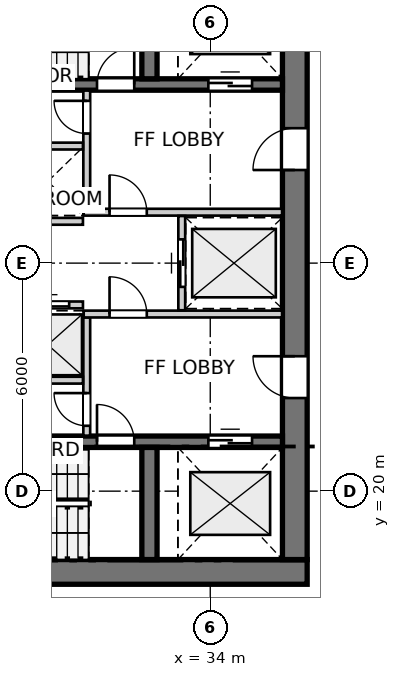
"""IFC4 building model, lengths in metres.
Left out: names, types, materials, properties, quantities, classifications, styles, units other than length and angle.
Written with IfcOpenShell. Run it as: python <this file> out.ifc"""

import sys

from ifc_helpers import new_model, si_unit, direction, frame, frame_2d, origin, place, context, subcontext, project, spatial, rectangle, extrude, source, transform, mapped, element, fill, save


model = new_model("IFC4")
c1 = context("Model", 3, precision=1e-05, world=origin(), true_north=direction((0.0, 1.0)))
c2 = subcontext(c1, "Body", "Model", "MODEL_VIEW")
j1 = project(units=[si_unit("LENGTHUNIT", "METRE"), si_unit("PLANEANGLEUNIT", "RADIAN")], contexts=[c1])
p1 = place(None, origin())
s1 = spatial("IfcSite", under=j1, at=p1, CompositionType="ELEMENT")
p2 = place(p1, origin())
s2 = spatial("IfcBuilding", under=s1, at=p2, CompositionType="ELEMENT")
p3 = place(p2, frame((0.0, 0.0, 118.4)))
s3 = spatial("IfcBuildingStorey", under=s2, at=p3, CompositionType="ELEMENT", Elevation=118.4)
p4 = place(p3, frame((24.15, 17.875, 0.0), z_axis=(0.0, 0.0, 1.0), x_axis=(1.0, 0.0, 0.0)))
e1 = element("IfcWall", 1, at=p4, inside=s3, PredefinedType="SHEAR", context=c2, shape_type="SweptSolid", body=[
    extrude(rectangle(XDim=12.4, YDim=0.65, at=frame_2d((6.2, 0.0))), origin(), (0.0, 0.0, 1.0), 2.95),
])
p5 = place(p3, frame((36.225, 18.2, 0.0), z_axis=(0.0, 0.0, 1.0), x_axis=(0.0, 1.0, 0.0)))
e2 = element("IfcWall", 2, at=p5, inside=s3, PredefinedType="SHEAR", context=c2, shape_type="SweptSolid", body=[
    extrude(rectangle(XDim=15.6, YDim=0.65, at=frame_2d((7.8, 0.0))), origin(), (0.0, 0.0, 1.0), 2.95),
])
p6 = place(p5, frame((4.25, 0.0, 0.0)))
e3 = element("IfcOpeningElement", 3, at=p6, cuts=e2, PredefinedType="OPENING", context=c2, shape_type="SweptSolid", body=[
    extrude(rectangle(XDim=1.1, YDim=2.15, at=frame_2d((0.55, 1.075))), frame((0.0, 0.335, 0.0), z_axis=(0.0, -1.0, 0.0), x_axis=(1.0, 0.0, 0.0)), (0.0, 0.0, 1.0), 0.67),
])
p7 = place(p5, frame((10.25, 0.0, 0.0)))
e4 = element("IfcOpeningElement", 4, at=p7, cuts=e2, PredefinedType="OPENING", context=c2, shape_type="SweptSolid", body=[
    extrude(rectangle(XDim=1.1, YDim=2.15, at=frame_2d((0.55, 1.075))), frame((0.0, 0.335, 0.0), z_axis=(0.0, -1.0, 0.0), x_axis=(1.0, 0.0, 0.0)), (0.0, 0.0, 1.0), 0.67),
])
p8 = place(p3, frame((24.8, 21.3, 0.0), z_axis=(0.0, 0.0, 1.0), x_axis=(1.0, 0.0, 0.0)))
e5 = element("IfcWall", 5, at=p8, inside=s3, PredefinedType="SHEAR", context=c2, shape_type="SweptSolid", body=[
    extrude(rectangle(XDim=11.1, YDim=0.3, at=frame_2d((5.55, 0.0))), origin(), (0.0, 0.0, 1.0), 2.95),
])
p9 = place(p8, frame((6.22, 0.0, 0.0)))
e6 = element("IfcOpeningElement", 6, at=p9, cuts=e5, PredefinedType="OPENING", context=c2, shape_type="SweptSolid", body=[
    extrude(rectangle(XDim=0.98, YDim=2.15, at=frame_2d((0.49, 1.075))), frame((0.0, 0.16, 0.0), z_axis=(0.0, -1.0, 0.0), x_axis=(1.0, 0.0, 0.0)), (0.0, 0.0, 1.0), 0.32),
])
p10 = place(p8, frame((9.15, 0.0, 0.0)))
e7 = element("IfcOpeningElement", 7, at=p10, cuts=e5, PredefinedType="OPENING", context=c2, shape_type="SweptSolid", body=[
    extrude(rectangle(XDim=1.15, YDim=2.15, at=frame_2d((0.575, 1.075))), frame((0.0, 0.16, 0.0), z_axis=(0.0, -1.0, 0.0), x_axis=(1.0, 0.0, 0.0)), (0.0, 0.0, 1.0), 0.32),
])
p11 = place(p3, frame((32.4, 18.2, 0.0), z_axis=(0.0, 0.0, 1.0), x_axis=(0.0, 1.0, 0.0)))
e8 = element("IfcWall", 8, at=p11, inside=s3, PredefinedType="SHEAR", context=c2, shape_type="SweptSolid", body=[
    extrude(rectangle(XDim=2.95, YDim=0.4, at=frame_2d((1.475, 0.0))), origin(), (0.0, 0.0, 1.0), 2.95),
])
p12 = place(p3, frame((24.8, 30.7, 0.0), z_axis=(0.0, 0.0, 1.0), x_axis=(1.0, 0.0, 0.0)))
e9 = element("IfcWall", 9, at=p12, inside=s3, PredefinedType="SHEAR", context=c2, shape_type="SweptSolid", body=[
    extrude(rectangle(XDim=11.1, YDim=0.3, at=frame_2d((5.55, 0.0))), origin(), (0.0, 0.0, 1.0), 2.95),
])
p13 = place(p12, frame((6.22, 0.0, 0.0)))
e10 = element("IfcOpeningElement", 10, at=p13, cuts=e9, PredefinedType="OPENING", context=c2, shape_type="SweptSolid", body=[
    extrude(rectangle(XDim=0.98, YDim=2.15, at=frame_2d((0.49, 1.075))), frame((0.0, 0.16, 0.0), z_axis=(0.0, -1.0, 0.0), x_axis=(1.0, 0.0, 0.0)), (0.0, 0.0, 1.0), 0.32),
])
p14 = place(p12, frame((9.15, 0.0, 0.0)))
e11 = element("IfcOpeningElement", 11, at=p14, cuts=e9, PredefinedType="OPENING", context=c2, shape_type="SweptSolid", body=[
    extrude(rectangle(XDim=1.15, YDim=2.15, at=frame_2d((0.575, 1.075))), frame((0.0, 0.16, 0.0), z_axis=(0.0, -1.0, 0.0), x_axis=(1.0, 0.0, 0.0)), (0.0, 0.0, 1.0), 0.32),
])
p15 = place(p3, frame((32.4, 30.85, 0.0), z_axis=(0.0, 0.0, 1.0), x_axis=(0.0, 1.0, 0.0)))
e12 = element("IfcWall", 12, at=p15, inside=s3, PredefinedType="SHEAR", context=c2, shape_type="SweptSolid", body=[
    extrude(rectangle(XDim=2.95, YDim=0.4, at=frame_2d((1.475, 0.0))), origin(), (0.0, 0.0, 1.0), 2.95),
])
p16 = place(p3, frame((30.75, 21.46, 0.0), z_axis=(0.0, 0.0, 1.0), x_axis=(0.0, 1.0, 0.0)))
e13 = element("IfcWall", 13, at=p16, inside=s3, PredefinedType="PARTITIONING", context=c2, shape_type="SweptSolid", body=[
    extrude(rectangle(XDim=3.11, YDim=0.18, at=frame_2d((1.555, 0.0))), origin(), (0.0, 0.0, 1.0), 2.95),
])
p17 = place(p16, frame((0.26, 0.0, 0.0)))
e14 = element("IfcOpeningElement", 14, at=p17, cuts=e13, PredefinedType="OPENING", context=c2, shape_type="SweptSolid", body=[
    extrude(rectangle(XDim=0.86, YDim=2.05, at=frame_2d((0.43, 1.025))), frame((0.0, 0.1, 0.0), z_axis=(0.0, -1.0, 0.0), x_axis=(1.0, 0.0, 0.0)), (0.0, 0.0, 1.0), 0.2),
])
p18 = place(p3, frame((30.67, 24.66, 0.0), z_axis=(0.0, 0.0, 1.0), x_axis=(1.0, 0.0, 0.0)))
e15 = element("IfcWall", 15, at=p18, inside=s3, PredefinedType="PARTITIONING", context=c2, shape_type="SweptSolid", body=[
    extrude(rectangle(XDim=5.22, YDim=0.18, at=frame_2d((2.61, 0.0))), origin(), (0.0, 0.0, 1.0), 2.95),
])
p19 = place(p18, frame((0.68, 0.0, 0.0)))
e16 = element("IfcOpeningElement", 16, at=p19, cuts=e15, PredefinedType="OPENING", context=c2, shape_type="SweptSolid", body=[
    extrude(rectangle(XDim=0.98, YDim=2.15, at=frame_2d((0.49, 1.075))), frame((0.0, 0.1, 0.0), z_axis=(0.0, -1.0, 0.0), x_axis=(1.0, 0.0, 0.0)), (0.0, 0.0, 1.0), 0.2),
])
p20 = place(p3, frame((30.75, 27.43, 0.0), z_axis=(0.0, 0.0, 1.0), x_axis=(0.0, 1.0, 0.0)))
e17 = element("IfcWall", 17, at=p20, inside=s3, PredefinedType="PARTITIONING", context=c2, shape_type="SweptSolid", body=[
    extrude(rectangle(XDim=3.11, YDim=0.18, at=frame_2d((1.555, 0.0))), origin(), (0.0, 0.0, 1.0), 2.95),
])
p21 = place(p20, frame((1.98, 0.0, 0.0)))
e18 = element("IfcOpeningElement", 18, at=p21, cuts=e17, PredefinedType="OPENING", context=c2, shape_type="SweptSolid", body=[
    extrude(rectangle(XDim=0.86, YDim=2.05, at=frame_2d((0.43, 1.025))), frame((0.0, 0.1, 0.0), z_axis=(0.0, -1.0, 0.0), x_axis=(1.0, 0.0, 0.0)), (0.0, 0.0, 1.0), 0.2),
])
p22 = place(p3, frame((30.67, 27.34, 0.0), z_axis=(0.0, 0.0, 1.0), x_axis=(1.0, 0.0, 0.0)))
e19 = element("IfcWall", 19, at=p22, inside=s3, PredefinedType="PARTITIONING", context=c2, shape_type="SweptSolid", body=[
    extrude(rectangle(XDim=5.22, YDim=0.18, at=frame_2d((2.61, 0.0))), origin(), (0.0, 0.0, 1.0), 2.95),
])
p23 = place(p22, frame((0.68, 0.0, 0.0)))
e20 = element("IfcOpeningElement", 20, at=p23, cuts=e19, PredefinedType="OPENING", context=c2, shape_type="SweptSolid", body=[
    extrude(rectangle(XDim=0.98, YDim=2.15, at=frame_2d((0.49, 1.075))), frame((0.0, 0.1, 0.0), z_axis=(0.0, -1.0, 0.0), x_axis=(1.0, 0.0, 0.0)), (0.0, 0.0, 1.0), 0.2),
])
p24 = place(p3, frame((33.25, 24.76, 0.0), z_axis=(0.0, 0.0, 1.0), x_axis=(0.0, 1.0, 0.0)))
e21 = element("IfcWall", 21, at=p24, inside=s3, PredefinedType="PARTITIONING", context=c2, shape_type="SweptSolid", body=[
    extrude(rectangle(XDim=2.48, YDim=0.18, at=frame_2d((1.24, 0.0))), origin(), (0.0, 0.0, 1.0), 2.95),
])
p25 = place(p24, frame((0.615, 0.0, 0.0)))
e22 = element("IfcOpeningElement", 22, at=p25, cuts=e21, PredefinedType="OPENING", context=c2, shape_type="SweptSolid", body=[
    extrude(rectangle(XDim=1.25, YDim=2.15, at=frame_2d((0.625, 1.075))), frame((0.0, 0.1, 0.0), z_axis=(0.0, -1.0, 0.0), x_axis=(1.0, 0.0, 0.0)), (0.0, 0.0, 1.0), 0.2),
])
p26 = place(p3, frame((24.81, 22.92, 0.0), z_axis=(0.0, 0.0, 1.0), x_axis=(1.0, 0.0, 0.0)))
e23 = element("IfcWall", 23, at=p26, inside=s3, PredefinedType="PARTITIONING", context=c2, shape_type="SweptSolid", body=[
    extrude(rectangle(XDim=5.84, YDim=0.18, at=frame_2d((2.92, 0.0))), origin(), (0.0, 0.0, 1.0), 2.95),
])
p27 = place(p3, frame((28.825, 24.9, 0.0), z_axis=(0.0, 0.0, 1.0), x_axis=(1.0, 0.0, 0.0)))
e24 = element("IfcWall", 24, at=p27, inside=s3, PredefinedType="PARTITIONING", context=c2, shape_type="SweptSolid", body=[
    extrude(rectangle(XDim=1.825, YDim=0.18, at=frame_2d((0.913, 0.0))), origin(), (0.0, 0.0, 1.0), 2.95),
])
p28 = place(p27, frame((0.363, 0.0, 0.0)))
e25 = element("IfcOpeningElement", 25, at=p28, cuts=e24, PredefinedType="OPENING", context=c2, shape_type="SweptSolid", body=[
    extrude(rectangle(XDim=1.1, YDim=2.15, at=frame_2d((0.55, 1.075))), frame((0.0, 0.1, 0.0), z_axis=(0.0, -1.0, 0.0), x_axis=(1.0, 0.0, 0.0)), (0.0, 0.0, 1.0), 0.2),
])
p29 = place(p3, frame((24.81, 29.08, 0.0), z_axis=(0.0, 0.0, 1.0), x_axis=(1.0, 0.0, 0.0)))
e26 = element("IfcWall", 26, at=p29, inside=s3, PredefinedType="PARTITIONING", context=c2, shape_type="SweptSolid", body=[
    extrude(rectangle(XDim=5.84, YDim=0.18, at=frame_2d((2.92, 0.0))), origin(), (0.0, 0.0, 1.0), 2.95),
])
p30 = place(p3, frame((28.825, 27.1, 0.0), z_axis=(0.0, 0.0, 1.0), x_axis=(1.0, 0.0, 0.0)))
e27 = element("IfcWall", 27, at=p30, inside=s3, PredefinedType="PARTITIONING", context=c2, shape_type="SweptSolid", body=[
    extrude(rectangle(XDim=1.825, YDim=0.18, at=frame_2d((0.913, 0.0))), origin(), (0.0, 0.0, 1.0), 2.95),
])
m1 = source(origin(), c2, "Body", "SweptSolid", [
    extrude(rectangle(XDim=0.98, YDim=2.15, at=frame_2d((0.49, 1.075))), frame((0.0, 0.025, 0.0), z_axis=(0.0, -1.0, 0.0), x_axis=(1.0, 0.0, 0.0)), (0.0, 0.0, 1.0), 0.05),
])
p31 = place(p9, origin())
e28 = element("IfcDoor", 28, at=p31, inside=s3, OperationType="SINGLE_SWING_LEFT", PredefinedType="DOOR", context=c2, shape_type="MappedRepresentation", body=[
    mapped(m1, transform((0.0, 0.0, 0.0), x_axis=(1.0, 0.0, 0.0), y_axis=(0.0, 1.0, 0.0), z_axis=(0.0, 0.0, 1.0), scale=1.0)),
])
fill(e6, e28)
m2 = source(origin(), c2, "Body", "SweptSolid", [
    extrude(rectangle(XDim=1.15, YDim=2.15, at=frame_2d((0.575, 1.075))), frame((0.0, 0.025, 0.0), z_axis=(0.0, -1.0, 0.0), x_axis=(1.0, 0.0, 0.0)), (0.0, 0.0, 1.0), 0.05),
])
p32 = place(p10, origin())
e29 = element("IfcDoor", 29, at=p32, inside=s3, OperationType="DOUBLE_DOOR_SLIDING", PredefinedType="DOOR", context=c2, shape_type="MappedRepresentation", body=[
    mapped(m2, transform((0.0, 0.0, 0.0), x_axis=(1.0, 0.0, 0.0), y_axis=(0.0, 1.0, 0.0), z_axis=(0.0, 0.0, 1.0), scale=1.0)),
])
fill(e7, e29)
p33 = place(p13, origin())
e30 = element("IfcDoor", 30, at=p33, inside=s3, OperationType="SINGLE_SWING_RIGHT", PredefinedType="DOOR", context=c2, shape_type="MappedRepresentation", body=[
    mapped(m1, transform((0.0, 0.0, 0.0), x_axis=(1.0, 0.0, 0.0), y_axis=(0.0, 1.0, 0.0), z_axis=(0.0, 0.0, 1.0), scale=1.0)),
])
fill(e10, e30)
p34 = place(p14, origin())
e31 = element("IfcDoor", 31, at=p34, inside=s3, OperationType="DOUBLE_DOOR_SLIDING", PredefinedType="DOOR", context=c2, shape_type="MappedRepresentation", body=[
    mapped(m2, transform((0.0, 0.0, 0.0), x_axis=(1.0, 0.0, 0.0), y_axis=(0.0, 1.0, 0.0), z_axis=(0.0, 0.0, 1.0), scale=1.0)),
])
fill(e11, e31)
m3 = source(origin(), c2, "Body", "SweptSolid", [
    extrude(rectangle(XDim=1.1, YDim=2.15, at=frame_2d((0.55, 1.075))), frame((0.0, 0.025, 0.0), z_axis=(0.0, -1.0, 0.0), x_axis=(1.0, 0.0, 0.0)), (0.0, 0.0, 1.0), 0.05),
])
p35 = place(p6, origin())
e32 = element("IfcDoor", 32, at=p35, inside=s3, OperationType="SINGLE_SWING_RIGHT", PredefinedType="DOOR", context=c2, shape_type="MappedRepresentation", body=[
    mapped(m3, transform((0.0, 0.0, 0.0), x_axis=(1.0, 0.0, 0.0), y_axis=(0.0, 1.0, 0.0), z_axis=(0.0, 0.0, 1.0), scale=1.0)),
])
fill(e3, e32)
p36 = place(p7, origin())
e33 = element("IfcDoor", 33, at=p36, inside=s3, OperationType="SINGLE_SWING_LEFT", PredefinedType="DOOR", context=c2, shape_type="MappedRepresentation", body=[
    mapped(m3, transform((0.0, 0.0, 0.0), x_axis=(1.0, 0.0, 0.0), y_axis=(0.0, 1.0, 0.0), z_axis=(0.0, 0.0, 1.0), scale=1.0)),
])
fill(e4, e33)
m4 = source(origin(), c2, "Body", "SweptSolid", [
    extrude(rectangle(XDim=0.86, YDim=2.05, at=frame_2d((0.43, 1.025))), frame((0.0, 0.025, 0.0), z_axis=(0.0, -1.0, 0.0), x_axis=(1.0, 0.0, 0.0)), (0.0, 0.0, 1.0), 0.05),
])
p37 = place(p17, origin())
e34 = element("IfcDoor", 34, at=p37, inside=s3, OperationType="SINGLE_SWING_RIGHT", PredefinedType="DOOR", context=c2, shape_type="MappedRepresentation", body=[
    mapped(m4, transform((0.0, 0.0, 0.0), x_axis=(1.0, 0.0, 0.0), y_axis=(0.0, 1.0, 0.0), z_axis=(0.0, 0.0, 1.0), scale=1.0)),
])
fill(e14, e34)
p38 = place(p19, origin())
e35 = element("IfcDoor", 35, at=p38, inside=s3, OperationType="SINGLE_SWING_LEFT", PredefinedType="DOOR", context=c2, shape_type="MappedRepresentation", body=[
    mapped(m1, transform((0.0, 0.0, 0.0), x_axis=(1.0, 0.0, 0.0), y_axis=(0.0, 1.0, 0.0), z_axis=(0.0, 0.0, 1.0), scale=1.0)),
])
fill(e16, e35)
p39 = place(p21, origin())
e36 = element("IfcDoor", 36, at=p39, inside=s3, OperationType="SINGLE_SWING_RIGHT", PredefinedType="DOOR", context=c2, shape_type="MappedRepresentation", body=[
    mapped(m4, transform((0.0, 0.0, 0.0), x_axis=(1.0, 0.0, 0.0), y_axis=(0.0, 1.0, 0.0), z_axis=(0.0, 0.0, 1.0), scale=1.0)),
])
fill(e18, e36)
p40 = place(p23, origin())
e37 = element("IfcDoor", 37, at=p40, inside=s3, OperationType="SINGLE_SWING_LEFT", PredefinedType="DOOR", context=c2, shape_type="MappedRepresentation", body=[
    mapped(m1, transform((0.0, 0.0, 0.0), x_axis=(1.0, 0.0, 0.0), y_axis=(0.0, 1.0, 0.0), z_axis=(0.0, 0.0, 1.0), scale=1.0)),
])
fill(e20, e37)
m5 = source(origin(), c2, "Body", "SweptSolid", [
    extrude(rectangle(XDim=1.25, YDim=2.15, at=frame_2d((0.625, 1.075))), frame((0.0, 0.025, 0.0), z_axis=(0.0, -1.0, 0.0), x_axis=(1.0, 0.0, 0.0)), (0.0, 0.0, 1.0), 0.05),
])
p41 = place(p25, origin())
e38 = element("IfcDoor", 38, at=p41, inside=s3, OperationType="DOUBLE_DOOR_SLIDING", PredefinedType="DOOR", context=c2, shape_type="MappedRepresentation", body=[
    mapped(m5, transform((0.0, 0.0, 0.0), x_axis=(1.0, 0.0, 0.0), y_axis=(0.0, 1.0, 0.0), z_axis=(0.0, 0.0, 1.0), scale=1.0)),
])
fill(e22, e38)
p42 = place(p28, origin())
e39 = element("IfcDoor", 39, at=p42, inside=s3, OperationType="DOUBLE_DOOR_SLIDING", PredefinedType="DOOR", context=c2, shape_type="MappedRepresentation", body=[
    mapped(m3, transform((0.0, 0.0, 0.0), x_axis=(1.0, 0.0, 0.0), y_axis=(0.0, 1.0, 0.0), z_axis=(0.0, 0.0, 1.0), scale=1.0)),
])
fill(e25, e39)
save(model, sys.argv[1])
